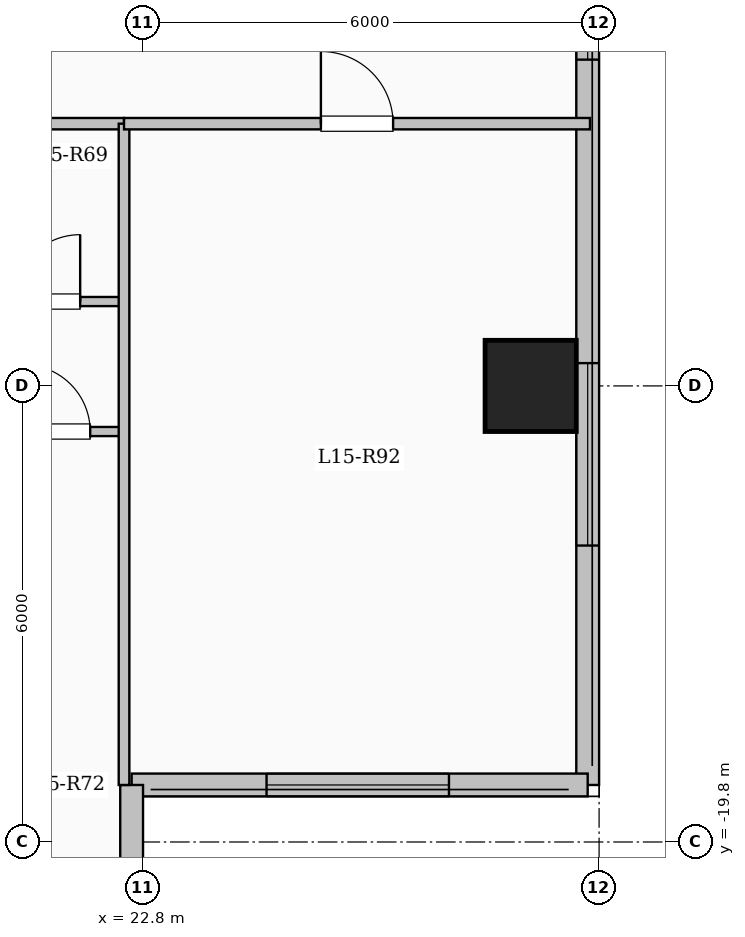
"""IFC4 building model, lengths in metres.
Left out: names, types, materials, properties, quantities, classifications, styles, units other than length and angle.
Written with IfcOpenShell. Run it as: python <this file> out.ifc"""

import sys

from ifc_helpers import new_model, si_unit, direction, frame, frame_2d, origin, origin_2d, place, context, subcontext, project, spatial, rectangle, extrude, element, fill, save


model = new_model("IFC4")
c1 = context("Model", 3, precision=1e-05, world=origin(), true_north=direction((0.0, 1.0)))
c2 = subcontext(c1, "Body", "Model", "MODEL_VIEW")
j1 = project(units=[si_unit("LENGTHUNIT", "METRE"), si_unit("PLANEANGLEUNIT", "RADIAN")], contexts=[c1])
p1 = place(None, origin())
s1 = spatial("IfcSite", under=j1, at=p1, CompositionType="ELEMENT")
p2 = place(p1, origin())
s2 = spatial("IfcBuilding", under=s1, at=p2, CompositionType="ELEMENT")
p3 = place(p2, frame((0.0, 0.0, 57.5)))
s3 = spatial("IfcBuildingStorey", under=s2, at=p3, CompositionType="ELEMENT", Elevation=57.5)
p4 = place(p3, frame((27.9, -13.8, 0.0), z_axis=(0.0, 0.0, 1.0), x_axis=(1.0, 0.0, 0.0)))
e1 = element("IfcColumn", 1, at=p4, inside=s3, PredefinedType="COLUMN", context=c2, shape_type="SweptSolid", body=[
    extrude(rectangle(XDim=1.2, YDim=1.2, at=origin_2d()), origin(), (0.0, 0.0, 1.0), 3.35),
])
p5 = place(p3, frame((28.65, 19.05, 0.0), z_axis=(0.0, 0.0, 1.0), x_axis=(0.0, -1.0, 0.0)))
e2 = element("IfcWall", 2, at=p5, inside=s3, PredefinedType="SOLIDWALL", context=c2, shape_type="SweptSolid", body=[
    extrude(rectangle(XDim=38.1, YDim=0.3, at=frame_2d((19.05, 0.0))), origin(), (0.0, 0.0, 1.0), 3.1),
])
p6 = place(p5, frame((2.275, 0.0, 0.9)))
e3 = element("IfcOpeningElement", 3, at=p6, cuts=e2, PredefinedType="OPENING", context=c2, shape_type="SweptSolid", body=[
    extrude(rectangle(XDim=2.0, YDim=1.7, at=frame_2d((1.0, 0.85))), frame((0.0, 0.16, 0.0), z_axis=(0.0, -1.0, 0.0), x_axis=(1.0, 0.0, 0.0)), (0.0, 0.0, 1.0), 0.32),
])
p7 = place(p5, frame((6.925, 0.0, 0.95)))
e4 = element("IfcOpeningElement", 4, at=p7, cuts=e2, PredefinedType="OPENING", context=c2, shape_type="SweptSolid", body=[
    extrude(rectangle(XDim=1.0, YDim=1.5, at=frame_2d((0.5, 0.75))), frame((0.0, 0.16, 0.0), z_axis=(0.0, -1.0, 0.0), x_axis=(1.0, 0.0, 0.0)), (0.0, 0.0, 1.0), 0.32),
])
p8 = place(p5, frame((10.175, 0.0, 0.9)))
e5 = element("IfcOpeningElement", 5, at=p8, cuts=e2, PredefinedType="OPENING", context=c2, shape_type="SweptSolid", body=[
    extrude(rectangle(XDim=2.0, YDim=1.7, at=frame_2d((1.0, 0.85))), frame((0.0, 0.16, 0.0), z_axis=(0.0, -1.0, 0.0), x_axis=(1.0, 0.0, 0.0)), (0.0, 0.0, 1.0), 0.32),
])
p9 = place(p5, frame((14.925, 0.0, 0.9)))
e6 = element("IfcOpeningElement", 6, at=p9, cuts=e2, PredefinedType="OPENING", context=c2, shape_type="SweptSolid", body=[
    extrude(rectangle(XDim=1.8, YDim=1.65, at=frame_2d((0.9, 0.825))), frame((0.0, 0.16, 0.0), z_axis=(0.0, -1.0, 0.0), x_axis=(1.0, 0.0, 0.0)), (0.0, 0.0, 1.0), 0.32),
])
p10 = place(p5, frame((20.75, 0.0, 0.9)))
e7 = element("IfcOpeningElement", 7, at=p10, cuts=e2, PredefinedType="OPENING", context=c2, shape_type="SweptSolid", body=[
    extrude(rectangle(XDim=2.4, YDim=1.8, at=frame_2d((1.2, 0.9))), frame((0.0, 0.16, 0.0), z_axis=(0.0, -1.0, 0.0), x_axis=(1.0, 0.0, 0.0)), (0.0, 0.0, 1.0), 0.32),
])
p11 = place(p5, frame((27.058, 0.0, 0.9)))
e8 = element("IfcOpeningElement", 8, at=p11, cuts=e2, PredefinedType="OPENING", context=c2, shape_type="SweptSolid", body=[
    extrude(rectangle(XDim=1.5, YDim=1.65, at=frame_2d((0.75, 0.825))), frame((0.0, 0.16, 0.0), z_axis=(0.0, -1.0, 0.0), x_axis=(1.0, 0.0, 0.0)), (0.0, 0.0, 1.0), 0.32),
])
p12 = place(p5, frame((32.55, 0.0, 0.9)))
e9 = element("IfcOpeningElement", 9, at=p12, cuts=e2, PredefinedType="OPENING", context=c2, shape_type="SweptSolid", body=[
    extrude(rectangle(XDim=2.4, YDim=1.8, at=frame_2d((1.2, 0.9))), frame((0.0, 0.16, 0.0), z_axis=(0.0, -1.0, 0.0), x_axis=(1.0, 0.0, 0.0)), (0.0, 0.0, 1.0), 0.32),
])
p13 = place(p3, frame((28.65, -19.05, 0.0), z_axis=(0.0, 0.0, 1.0), x_axis=(-1.0, 0.0, 0.0)))
e10 = element("IfcWall", 10, at=p13, inside=s3, PredefinedType="SOLIDWALL", context=c2, shape_type="SweptSolid", body=[
    extrude(rectangle(XDim=6.0, YDim=0.3, at=frame_2d((3.0, 0.0))), origin(), (0.0, 0.0, 1.0), 3.1),
])
p14 = place(p13, frame((1.825, 0.0, 0.9)))
e11 = element("IfcOpeningElement", 11, at=p14, cuts=e10, PredefinedType="OPENING", context=c2, shape_type="SweptSolid", body=[
    extrude(rectangle(XDim=2.4, YDim=1.8, at=frame_2d((1.2, 0.9))), frame((0.0, 0.16, 0.0), z_axis=(0.0, -1.0, 0.0), x_axis=(1.0, 0.0, 0.0)), (0.0, 0.0, 1.0), 0.32),
])
p15 = place(p3, frame((22.65, -19.05, 0.0), z_axis=(0.0, 0.0, 1.0), x_axis=(0.0, -1.0, 0.0)))
e12 = element("IfcWall", 12, at=p15, inside=s3, PredefinedType="SOLIDWALL", context=c2, shape_type="SweptSolid", body=[
    extrude(rectangle(XDim=4.5, YDim=0.3, at=frame_2d((2.25, 0.0))), origin(), (0.0, 0.0, 1.0), 3.1),
])
p16 = place(p15, frame((1.333, 0.0, 0.9)))
e13 = element("IfcOpeningElement", 13, at=p16, cuts=e12, PredefinedType="OPENING", context=c2, shape_type="SweptSolid", body=[
    extrude(rectangle(XDim=1.8, YDim=1.65, at=frame_2d((0.9, 0.825))), frame((0.0, 0.16, 0.0), z_axis=(0.0, -1.0, 0.0), x_axis=(1.0, 0.0, 0.0)), (0.0, 0.0, 1.0), 0.32),
])
p17 = place(p3, frame((8.55, -10.35, 0.0), z_axis=(0.0, 0.0, 1.0), x_axis=(1.0, 0.0, 0.0)))
e14 = element("IfcWall", 14, at=p17, inside=s3, PredefinedType="PARTITIONING", context=c2, shape_type="SweptSolid", body=[
    extrude(rectangle(XDim=14.0, YDim=0.15, at=frame_2d((7.0, 0.0))), origin(), (0.0, 0.0, 1.0), 3.1),
])
p18 = place(p17, frame((0.75, 0.0, 0.0)))
e15 = element("IfcOpeningElement", 15, at=p18, cuts=e14, PredefinedType="OPENING", context=c2, shape_type="SweptSolid", body=[
    extrude(rectangle(XDim=0.96, YDim=2.15, at=frame_2d((0.48, 1.075))), frame((0.0, 0.085, 0.0), z_axis=(0.0, -1.0, 0.0), x_axis=(1.0, 0.0, 0.0)), (0.0, 0.0, 1.0), 0.17),
])
p19 = place(p17, frame((6.888, 0.0, 0.0)))
e16 = element("IfcOpeningElement", 16, at=p19, cuts=e14, PredefinedType="OPENING", context=c2, shape_type="SweptSolid", body=[
    extrude(rectangle(XDim=0.96, YDim=2.15, at=frame_2d((0.48, 1.075))), frame((0.0, 0.085, 0.0), z_axis=(0.0, -1.0, 0.0), x_axis=(1.0, 0.0, 0.0)), (0.0, 0.0, 1.0), 0.17),
])
p20 = place(p3, frame((20.515, -12.69, 0.0), z_axis=(0.0, 0.0, 1.0), x_axis=(1.0, 0.0, 0.0)))
e17 = element("IfcWall", 17, at=p20, inside=s3, PredefinedType="PARTITIONING", context=c2, shape_type="SweptSolid", body=[
    extrude(rectangle(XDim=2.035, YDim=0.12, at=frame_2d((1.018, 0.0))), origin(), (0.0, 0.0, 1.0), 3.1),
])
p21 = place(p20, frame((0.578, 0.0, 0.0)))
e18 = element("IfcOpeningElement", 18, at=p21, cuts=e17, PredefinedType="OPENING", context=c2, shape_type="SweptSolid", body=[
    extrude(rectangle(XDim=0.88, YDim=2.1, at=frame_2d((0.44, 1.05))), frame((0.0, 0.07, 0.0), z_axis=(0.0, -1.0, 0.0), x_axis=(1.0, 0.0, 0.0)), (0.0, 0.0, 1.0), 0.14),
])
p22 = place(p3, frame((17.838, -14.4, 0.0), z_axis=(0.0, 0.0, 1.0), x_axis=(1.0, 0.0, 0.0)))
e19 = element("IfcWall", 19, at=p22, inside=s3, PredefinedType="PARTITIONING", context=c2, shape_type="SweptSolid", body=[
    extrude(rectangle(XDim=4.772, YDim=0.12, at=frame_2d((2.386, 0.0))), origin(), (0.0, 0.0, 1.0), 3.1),
])
p23 = place(p22, frame((0.325, 0.0, 0.0)))
e20 = element("IfcOpeningElement", 20, at=p23, cuts=e19, PredefinedType="OPENING", context=c2, shape_type="SweptSolid", body=[
    extrude(rectangle(XDim=0.88, YDim=2.1, at=frame_2d((0.44, 1.05))), frame((0.0, 0.07, 0.0), z_axis=(0.0, -1.0, 0.0), x_axis=(1.0, 0.0, 0.0)), (0.0, 0.0, 1.0), 0.14),
])
p24 = place(p22, frame((1.856, 0.0, 0.0)))
e21 = element("IfcOpeningElement", 21, at=p24, cuts=e19, PredefinedType="OPENING", context=c2, shape_type="SweptSolid", body=[
    extrude(rectangle(XDim=0.88, YDim=2.1, at=frame_2d((0.44, 1.05))), frame((0.0, 0.07, 0.0), z_axis=(0.0, -1.0, 0.0), x_axis=(1.0, 0.0, 0.0)), (0.0, 0.0, 1.0), 0.14),
])
p25 = place(p22, frame((3.387, 0.0, 0.0)))
e22 = element("IfcOpeningElement", 22, at=p25, cuts=e19, PredefinedType="OPENING", context=c2, shape_type="SweptSolid", body=[
    extrude(rectangle(XDim=0.88, YDim=2.1, at=frame_2d((0.44, 1.05))), frame((0.0, 0.07, 0.0), z_axis=(0.0, -1.0, 0.0), x_axis=(1.0, 0.0, 0.0)), (0.0, 0.0, 1.0), 0.14),
])
p26 = place(p3, frame((22.55, -19.05, 0.0), z_axis=(0.0, 0.0, 1.0), x_axis=(0.0, 1.0, 0.0)))
e23 = element("IfcWall", 23, at=p26, inside=s3, PredefinedType="PARTITIONING", context=c2, shape_type="SweptSolid", body=[
    extrude(rectangle(XDim=8.7, YDim=0.14, at=frame_2d((4.35, 0.0))), origin(), (0.0, 0.0, 1.0), 3.1),
])
p27 = place(p3, frame((22.55, -10.35, 0.0), z_axis=(0.0, 0.0, 1.0), x_axis=(1.0, 0.0, 0.0)))
e24 = element("IfcWall", 24, at=p27, inside=s3, PredefinedType="PARTITIONING", context=c2, shape_type="SweptSolid", body=[
    extrude(rectangle(XDim=6.13, YDim=0.15, at=frame_2d((3.065, 0.0))), origin(), (0.0, 0.0, 1.0), 3.1),
])
p28 = place(p27, frame((2.59, 0.0, 0.0)))
e25 = element("IfcOpeningElement", 25, at=p28, cuts=e24, PredefinedType="OPENING", context=c2, shape_type="SweptSolid", body=[
    extrude(rectangle(XDim=0.95, YDim=2.15, at=frame_2d((0.475, 1.075))), frame((0.0, 0.085, 0.0), z_axis=(0.0, -1.0, 0.0), x_axis=(1.0, 0.0, 0.0)), (0.0, 0.0, 1.0), 0.17),
])
p29 = place(p11, origin())
e26 = element("IfcWindow", 26, at=p29, inside=s3, PartitioningType="SINGLE_PANEL", PredefinedType="WINDOW", context=c2, shape_type="SweptSolid", body=[
    extrude(rectangle(XDim=1.5, YDim=1.65, at=frame_2d((0.75, 0.825))), frame((0.0, 0.03, 0.0), z_axis=(0.0, -1.0, 0.0), x_axis=(1.0, 0.0, 0.0)), (0.0, 0.0, 1.0), 0.06),
])
fill(e8, e26)
p30 = place(p12, origin())
e27 = element("IfcWindow", 27, at=p30, inside=s3, PartitioningType="SINGLE_PANEL", PredefinedType="WINDOW", context=c2, shape_type="SweptSolid", body=[
    extrude(rectangle(XDim=2.4, YDim=1.8, at=frame_2d((1.2, 0.9))), frame((0.0, 0.03, 0.0), z_axis=(0.0, -1.0, 0.0), x_axis=(1.0, 0.0, 0.0)), (0.0, 0.0, 1.0), 0.06),
])
fill(e9, e27)
p31 = place(p14, origin())
e28 = element("IfcWindow", 28, at=p31, inside=s3, PartitioningType="SINGLE_PANEL", PredefinedType="WINDOW", context=c2, shape_type="SweptSolid", body=[
    extrude(rectangle(XDim=2.4, YDim=1.8, at=frame_2d((1.2, 0.9))), frame((0.0, 0.03, 0.0), z_axis=(0.0, -1.0, 0.0), x_axis=(1.0, 0.0, 0.0)), (0.0, 0.0, 1.0), 0.06),
])
fill(e11, e28)
p32 = place(p21, origin())
e29 = element("IfcDoor", 29, at=p32, inside=s3, OperationType="SINGLE_SWING_RIGHT", PredefinedType="DOOR", context=c2, shape_type="SweptSolid", body=[
    extrude(rectangle(XDim=0.88, YDim=2.1, at=frame_2d((0.44, 1.05))), frame((0.0, 0.025, 0.0), z_axis=(0.0, -1.0, 0.0), x_axis=(1.0, 0.0, 0.0)), (0.0, 0.0, 1.0), 0.05),
])
fill(e18, e29)
p33 = place(p25, origin())
e30 = element("IfcDoor", 30, at=p33, inside=s3, OperationType="SINGLE_SWING_LEFT", PredefinedType="DOOR", context=c2, shape_type="SweptSolid", body=[
    extrude(rectangle(XDim=0.88, YDim=2.1, at=frame_2d((0.44, 1.05))), frame((0.0, 0.025, 0.0), z_axis=(0.0, -1.0, 0.0), x_axis=(1.0, 0.0, 0.0)), (0.0, 0.0, 1.0), 0.05),
])
fill(e22, e30)
p34 = place(p28, origin())
e31 = element("IfcDoor", 31, at=p34, inside=s3, OperationType="SINGLE_SWING_LEFT", PredefinedType="DOOR", context=c2, shape_type="SweptSolid", body=[
    extrude(rectangle(XDim=0.95, YDim=2.15, at=frame_2d((0.475, 1.075))), frame((0.0, 0.025, 0.0), z_axis=(0.0, -1.0, 0.0), x_axis=(1.0, 0.0, 0.0)), (0.0, 0.0, 1.0), 0.05),
])
fill(e25, e31)
save(model, sys.argv[1])
